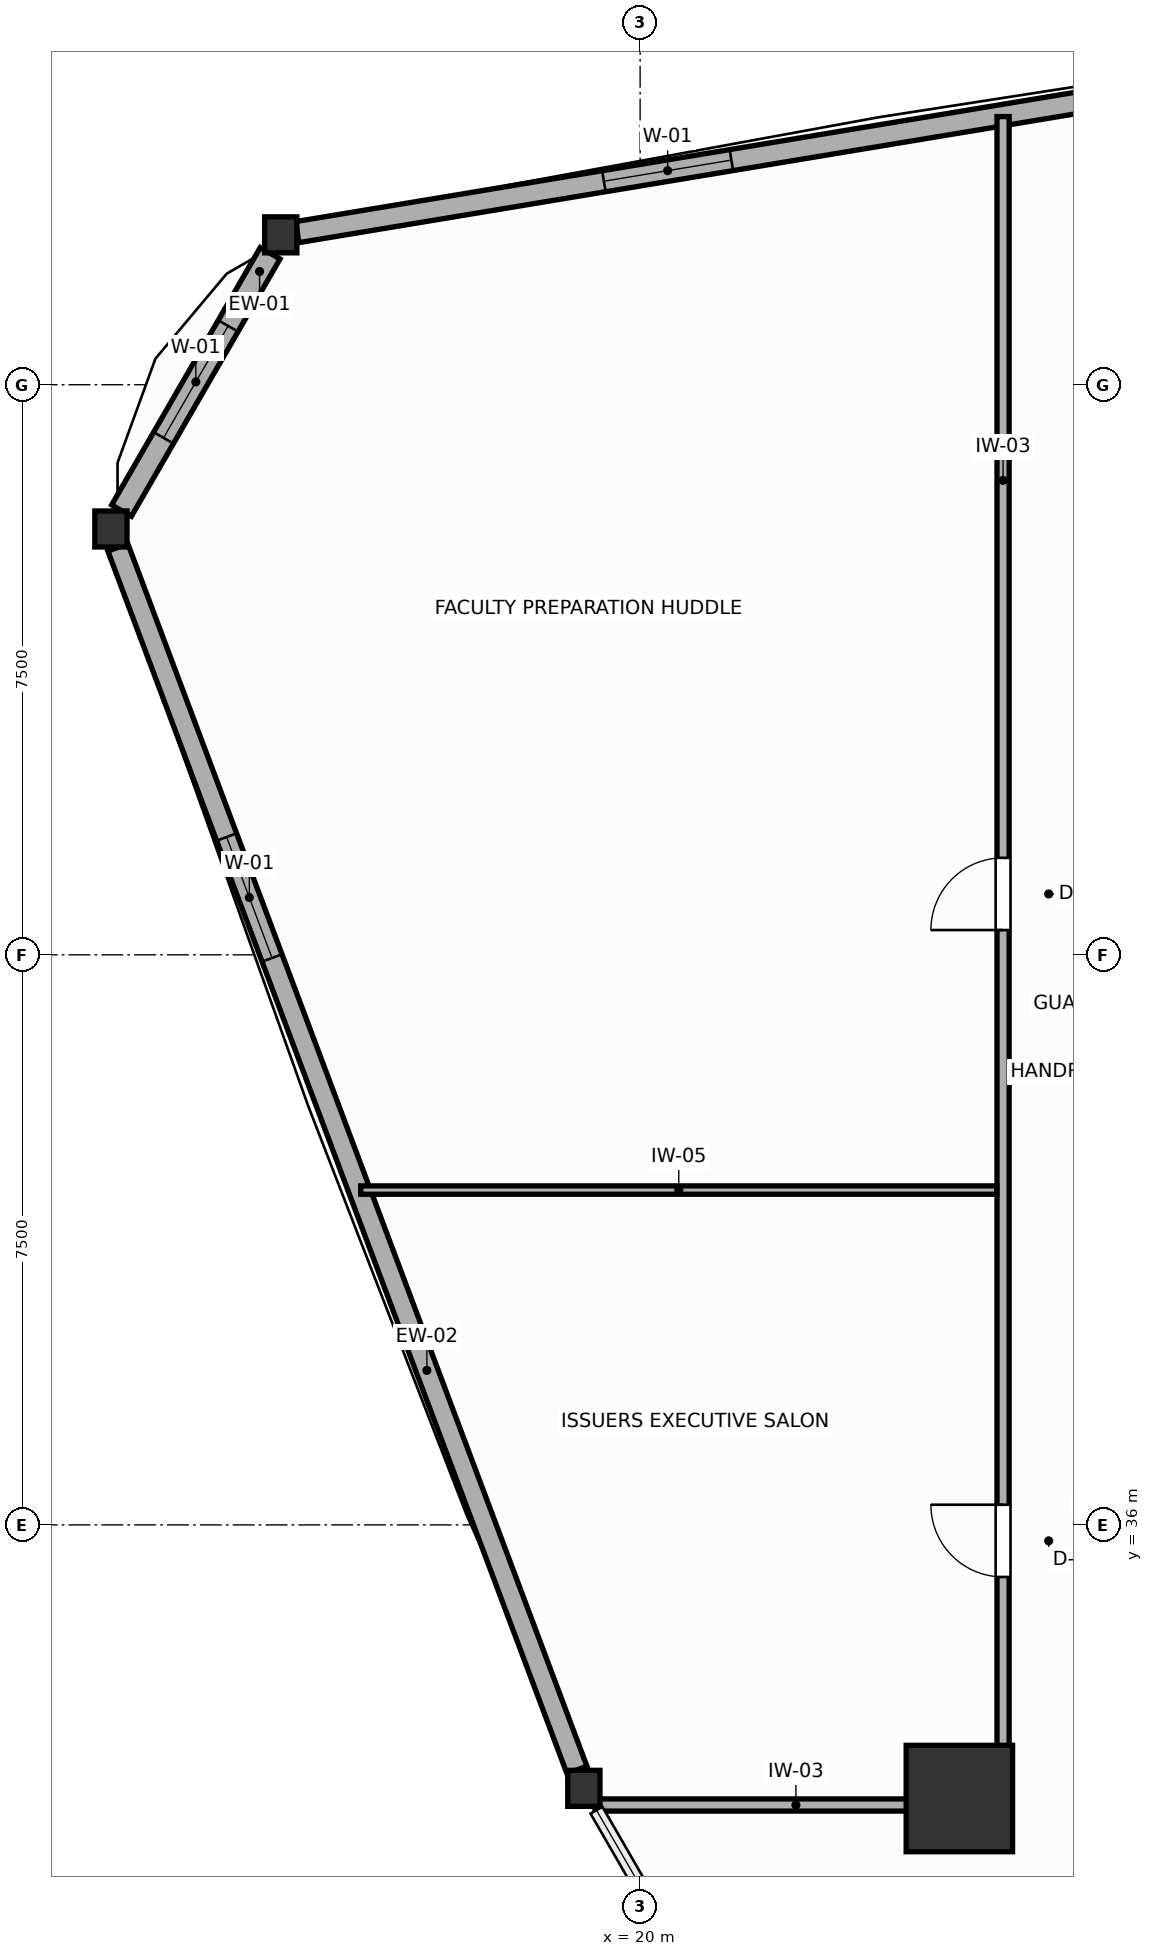
"""IFC4 building model, lengths in metres.
Left out: names, types, materials, properties, quantities, classifications, styles, units other than length and angle.
Written with IfcOpenShell. Run it as: python <this file> out.ifc"""

import sys

from ifc_helpers import new_model, si_unit, direction, frame, frame_2d, origin, origin_2d, place, context, subcontext, project, spatial, rectangle, i_section, extrude, source, transform, mapped, element, fill, save


model = new_model("IFC4")
c1 = context("Model", 3, precision=1e-05, world=origin(), true_north=direction((0.0, 1.0)))
c2 = subcontext(c1, "Body", "Model", "MODEL_VIEW")
j1 = project(units=[si_unit("LENGTHUNIT", "METRE"), si_unit("PLANEANGLEUNIT", "RADIAN")], contexts=[c1])
p1 = place(None, origin())
s1 = spatial("IfcSite", under=j1, at=p1, CompositionType="ELEMENT")
p2 = place(p1, origin())
s2 = spatial("IfcBuilding", under=s1, at=p2, CompositionType="ELEMENT")
p3 = place(p2, frame((0.0, 0.0, 79.5)))
s3 = spatial("IfcBuildingStorey", under=s2, at=p3, CompositionType="ELEMENT", Elevation=79.5)
m1 = source(origin(), c2, "Body", "SweptSolid", [
    extrude(rectangle(XDim=1.4, YDim=1.4, at=origin_2d()), origin(), (0.0, 0.0, 1.0), 3.9),
])
p4 = place(p3, frame((24.2, 32.4, 0.0), z_axis=(0.0, 0.0, 1.0), x_axis=(1.0, 0.0, 0.0)))
e1 = element("IfcColumn", 1, at=p4, inside=s3, PredefinedType="COLUMN", context=c2, shape_type="MappedRepresentation", body=[
    mapped(m1, transform((0.0, 0.0, 0.0), scale=1.0)),
])
m2 = source(origin(), c2, "Body", "SweptSolid", [
    extrude(i_section(OverallWidth=0.424, OverallDepth=0.474, WebThickness=0.045, FlangeThickness=0.072, FilletRadius=0.015, at=origin_2d()), origin(), (0.0, 0.0, 1.0), 3.9),
])
for number, where, z_axis, x_axis in (
    (2, (15.272, 52.972, 0.0), (0.0, 0.0, 1.0), (1.0, 0.0, 0.0)),
    (3, (13.038, 49.102, 0.0), (0.0, 0.0, 1.0), (1.0, 0.0, 0.0)),
    (4, (19.26, 32.534, 0.0), (0.0, 0.0, 1.0), (1.0, 0.0, 0.0)),
):
    element("IfcColumn", number, at=place(p3, frame(where, z_axis=z_axis, x_axis=x_axis)), inside=s3, PredefinedType="COLUMN", context=c2, shape_type="MappedRepresentation", body=[
        mapped(m2, transform((0.0, 0.0, 0.0), scale=1.0)),
    ])
p5 = place(p3, frame((32.514, 55.832, 0.0), z_axis=(0.0, 0.0, 1.0), x_axis=(-0.986523610756, -0.163618964122, 0.0)))
e5 = element("IfcWall", 5, at=p5, inside=s3, PredefinedType="SOLIDWALL", context=c2, shape_type="SweptSolid", body=[
    extrude(rectangle(XDim=17.258, YDim=0.28, at=frame_2d((8.629, 0.0))), origin(), (0.0, 0.0, 1.0), 3.23),
])
p6 = place(p5, frame((11.469, 0.0, 0.75)))
e6 = element("IfcOpeningElement", 6, at=p6, cuts=e5, PredefinedType="OPENING", context=c2, shape_type="SweptSolid", body=[
    extrude(rectangle(XDim=1.7, YDim=1.75, at=frame_2d((0.85, 0.875))), frame((0.0, 0.15, 0.0), z_axis=(0.0, -1.0, 0.0), x_axis=(1.0, 0.0, 0.0)), (0.0, 0.0, 1.0), 0.3),
])
p7 = place(p3, frame((15.132, 52.73, 0.0), z_axis=(0.0, 0.0, 1.0), x_axis=(-0.500014353419, -0.866017116675, 0.0)))
e7 = element("IfcWall", 7, at=p7, inside=s3, PredefinedType="SOLIDWALL", context=c2, shape_type="SweptSolid", body=[
    extrude(rectangle(XDim=3.91, YDim=0.3, at=frame_2d((1.955, 0.0))), origin(), (0.0, 0.0, 1.0), 3.23),
])
p8 = place(p7, frame((1.105, 0.0, 0.75)))
e8 = element("IfcOpeningElement", 8, at=p8, cuts=e7, PredefinedType="OPENING", context=c2, shape_type="SweptSolid", body=[
    extrude(rectangle(XDim=1.7, YDim=1.75, at=frame_2d((0.85, 0.875))), frame((0.0, 0.16, 0.0), z_axis=(0.0, -1.0, 0.0), x_axis=(1.0, 0.0, 0.0)), (0.0, 0.0, 1.0), 0.32),
])
p9 = place(p3, frame((13.129, 48.86, 0.0), z_axis=(0.0, 0.0, 1.0), x_axis=(0.351559441404, -0.936165561832, 0.0)))
e9 = element("IfcWall", 9, at=p9, inside=s3, PredefinedType="SOLIDWALL", context=c2, shape_type="SweptSolid", body=[
    extrude(rectangle(XDim=17.181, YDim=0.28, at=frame_2d((8.59, 0.0))), origin(), (0.0, 0.0, 1.0), 3.23),
])
p10 = place(p9, frame((4.07, 0.0, 0.75)))
e10 = element("IfcOpeningElement", 10, at=p10, cuts=e9, PredefinedType="OPENING", context=c2, shape_type="SweptSolid", body=[
    extrude(rectangle(XDim=1.7, YDim=1.75, at=frame_2d((0.85, 0.875))), frame((0.0, 0.15, 0.0), z_axis=(0.0, -1.0, 0.0), x_axis=(1.0, 0.0, 0.0)), (0.0, 0.0, 1.0), 0.3),
])
p11 = place(p3, frame((24.775, 32.31, 0.0), z_axis=(0.0, 0.0, 1.0), x_axis=(0.0, 1.0, 0.0)))
e11 = element("IfcWall", 11, at=p11, inside=s3, PredefinedType="PARTITIONING", context=c2, shape_type="SweptSolid", body=[
    extrude(rectangle(XDim=22.218, YDim=0.16, at=frame_2d((11.109, 0.0))), origin(), (0.0, 0.0, 1.0), 3.68),
])
p12 = place(p11, frame((3.005, 0.0, 0.0)))
e12 = element("IfcOpeningElement", 12, at=p12, cuts=e11, PredefinedType="OPENING", context=c2, shape_type="SweptSolid", body=[
    extrude(rectangle(XDim=0.95, YDim=2.05, at=frame_2d((0.475, 1.025))), frame((0.0, 0.09, 0.0), z_axis=(0.0, -1.0, 0.0), x_axis=(1.0, 0.0, 0.0)), (0.0, 0.0, 1.0), 0.18),
])
p13 = place(p11, frame((11.516, 0.0, 0.0)))
e13 = element("IfcOpeningElement", 13, at=p13, cuts=e11, PredefinedType="OPENING", context=c2, shape_type="SweptSolid", body=[
    extrude(rectangle(XDim=0.95, YDim=2.05, at=frame_2d((0.475, 1.025))), frame((0.0, 0.09, 0.0), z_axis=(0.0, -1.0, 0.0), x_axis=(1.0, 0.0, 0.0)), (0.0, 0.0, 1.0), 0.18),
])
p14 = place(p3, frame((19.406, 32.315, 0.0), z_axis=(0.0, 0.0, 1.0), x_axis=(1.0, 0.0, 0.0)))
e14 = element("IfcWall", 14, at=p14, inside=s3, PredefinedType="PARTITIONING", context=c2, shape_type="SweptSolid", body=[
    extrude(rectangle(XDim=5.287, YDim=0.16, at=frame_2d((2.644, 0.0))), origin(), (0.0, 0.0, 1.0), 3.18),
])
p15 = place(p3, frame((16.324, 40.405, 0.0), z_axis=(0.0, 0.0, 1.0), x_axis=(1.0, 0.0, 0.0)))
e15 = element("IfcWall", 15, at=p15, inside=s3, PredefinedType="MOVABLE", context=c2, shape_type="SweptSolid", body=[
    extrude(rectangle(XDim=8.369, YDim=0.11, at=frame_2d((4.185, 0.0))), origin(), (0.0, 0.0, 1.0), 3.68),
])
p16 = place(p6, origin())
e16 = element("IfcWindow", 16, at=p16, inside=s3, PartitioningType="SINGLE_PANEL", PredefinedType="WINDOW", context=c2, shape_type="SweptSolid", body=[
    extrude(rectangle(XDim=1.7, YDim=1.75, at=frame_2d((0.85, 0.875))), frame((0.0, 0.03, 0.0), z_axis=(0.0, -1.0, 0.0), x_axis=(1.0, 0.0, 0.0)), (0.0, 0.0, 1.0), 0.06),
])
fill(e6, e16)
p17 = place(p8, origin())
e17 = element("IfcWindow", 17, at=p17, inside=s3, PartitioningType="SINGLE_PANEL", PredefinedType="WINDOW", context=c2, shape_type="SweptSolid", body=[
    extrude(rectangle(XDim=1.7, YDim=1.75, at=frame_2d((0.85, 0.875))), frame((0.0, 0.03, 0.0), z_axis=(0.0, -1.0, 0.0), x_axis=(1.0, 0.0, 0.0)), (0.0, 0.0, 1.0), 0.06),
])
fill(e8, e17)
p18 = place(p10, origin())
e18 = element("IfcWindow", 18, at=p18, inside=s3, PartitioningType="SINGLE_PANEL", PredefinedType="WINDOW", context=c2, shape_type="SweptSolid", body=[
    extrude(rectangle(XDim=1.7, YDim=1.75, at=frame_2d((0.85, 0.875))), frame((0.0, 0.03, 0.0), z_axis=(0.0, -1.0, 0.0), x_axis=(1.0, 0.0, 0.0)), (0.0, 0.0, 1.0), 0.06),
])
fill(e10, e18)
p19 = place(p12, origin())
e19 = element("IfcDoor", 19, at=p19, inside=s3, OperationType="SINGLE_SWING_RIGHT", PredefinedType="DOOR", context=c2, shape_type="SweptSolid", body=[
    extrude(rectangle(XDim=0.95, YDim=2.05, at=frame_2d((0.475, 1.025))), frame((0.0, 0.025, 0.0), z_axis=(0.0, -1.0, 0.0), x_axis=(1.0, 0.0, 0.0)), (0.0, 0.0, 1.0), 0.05),
])
fill(e12, e19)
p20 = place(p13, origin())
e20 = element("IfcDoor", 20, at=p20, inside=s3, OperationType="SINGLE_SWING_LEFT", PredefinedType="DOOR", context=c2, shape_type="SweptSolid", body=[
    extrude(rectangle(XDim=0.95, YDim=2.05, at=frame_2d((0.475, 1.025))), frame((0.0, 0.025, 0.0), z_axis=(0.0, -1.0, 0.0), x_axis=(1.0, 0.0, 0.0)), (0.0, 0.0, 1.0), 0.05),
])
fill(e13, e20)
save(model, sys.argv[1])
